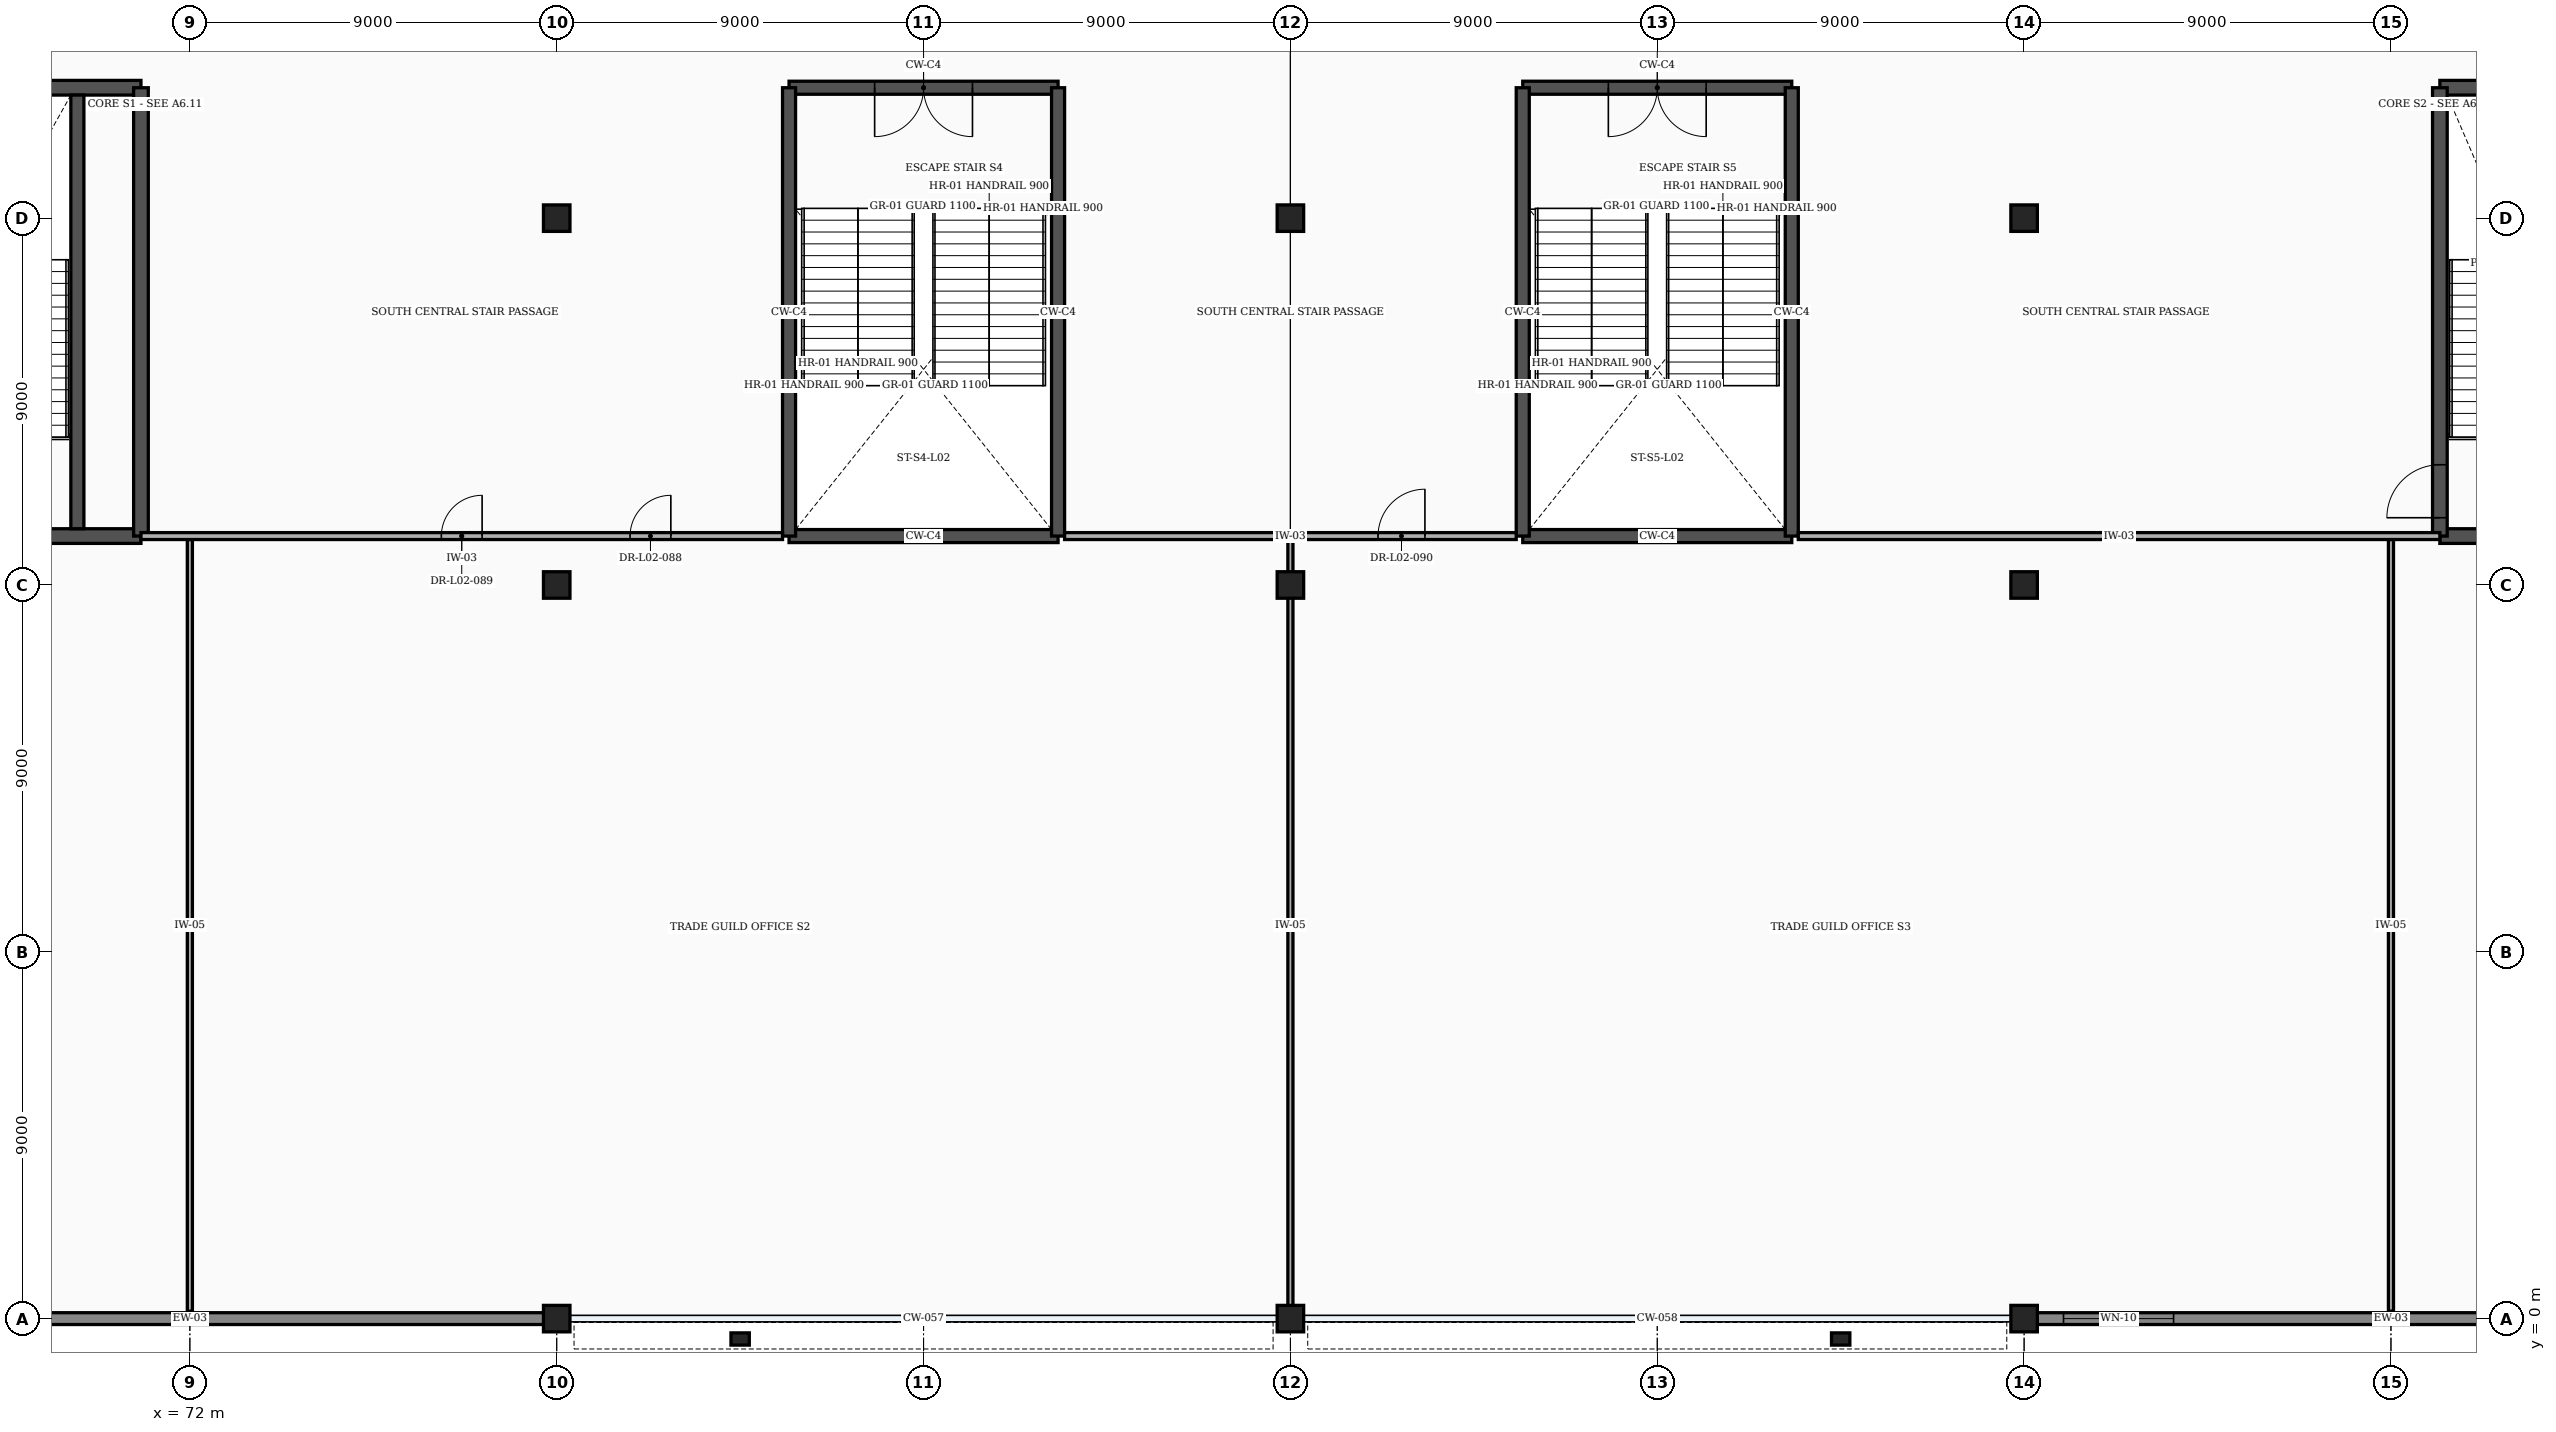
"""IFC4 building model, lengths in metres.
Left out: names, types, materials, properties, quantities, classifications, styles, units other than length and angle.
Written with IfcOpenShell. Run it as: python <this file> out.ifc"""

import sys

from ifc_helpers import new_model, si_unit, direction, frame, frame_2d, origin, origin_2d, place, context, subcontext, project, spatial, rectangle, extrude, element, fill, save


model = new_model("IFC4")
c1 = context("Model", 3, precision=1e-05, world=origin(), true_north=direction((0.0, 1.0)))
c2 = subcontext(c1, "Body", "Model", "MODEL_VIEW")
j1 = project(units=[si_unit("LENGTHUNIT", "METRE"), si_unit("PLANEANGLEUNIT", "RADIAN")], contexts=[c1])
p1 = place(None, origin())
s1 = spatial("IfcSite", under=j1, at=p1, CompositionType="ELEMENT")
p2 = place(p1, origin())
s2 = spatial("IfcBuilding", under=s1, at=p2, CompositionType="ELEMENT")
p3 = place(p2, frame((0.0, 0.0, 11.4)))
s3 = spatial("IfcBuildingStorey", under=s2, at=p3, CompositionType="ELEMENT", Elevation=11.4)
for number, where, z_axis, x_axis in (
    (1, (81.0, 0.0, 0.0), (0.0, 0.0, 1.0), (1.0, 0.0, 0.0)),
    (2, (81.0, 18.0, 0.0), (0.0, 0.0, 1.0), (1.0, 0.0, 0.0)),
    (3, (81.0, 27.0, 0.0), (0.0, 0.0, 1.0), (1.0, 0.0, 0.0)),
    (4, (99.0, 0.0, 0.0), (0.0, 0.0, 1.0), (1.0, 0.0, 0.0)),
    (5, (99.0, 18.0, 0.0), (0.0, 0.0, 1.0), (1.0, 0.0, 0.0)),
    (6, (99.0, 27.0, 0.0), (0.0, 0.0, 1.0), (1.0, 0.0, 0.0)),
    (7, (117.0, 0.0, 0.0), (0.0, 0.0, 1.0), (1.0, 0.0, 0.0)),
    (8, (117.0, 18.0, 0.0), (0.0, 0.0, 1.0), (1.0, 0.0, 0.0)),
    (9, (117.0, 27.0, 0.0), (0.0, 0.0, 1.0), (1.0, 0.0, 0.0)),
):
    element("IfcColumn", number, at=place(p3, frame(where, z_axis=z_axis, x_axis=x_axis)), inside=s3, PredefinedType="COLUMN", context=c2, shape_type="SweptSolid", body=[
        extrude(rectangle(XDim=0.65, YDim=0.65, at=origin_2d()), origin(), (0.0, 0.0, 1.0), 5.4),
    ])
for number, where, z_axis, x_axis in (
    (10, (85.5, -0.5, 0.0), (0.0, 0.0, 1.0), (1.0, 0.0, 0.0)),
    (11, (112.5, -0.5, 0.0), (0.0, 0.0, 1.0), (1.0, 0.0, 0.0)),
):
    element("IfcColumn", number, at=place(p3, frame(where, z_axis=z_axis, x_axis=x_axis)), inside=s3, PredefinedType="PILASTER", context=c2, shape_type="SweptSolid", body=[
        extrude(rectangle(XDim=0.45, YDim=0.3, at=origin_2d()), origin(), (0.0, 0.0, 1.0), 5.4),
    ])
p4 = place(p3, frame((63.317, 0.0, 0.0), z_axis=(0.0, 0.0, 1.0), x_axis=(1.0, 0.0, 0.0)))
e12 = element("IfcWall", 12, at=p4, inside=s3, PredefinedType="STANDARD", context=c2, shape_type="SweptSolid", body=[
    extrude(rectangle(XDim=17.366, YDim=0.29, at=frame_2d((8.683, 0.0))), origin(), (0.0, 0.0, 1.0), 4.38),
])
p5 = place(p4, frame((0.65, 0.0, 0.85)))
e13 = element("IfcOpeningElement", 13, at=p5, cuts=e12, PredefinedType="OPENING", context=c2, shape_type="SweptSolid", body=[
    extrude(rectangle(XDim=2.7, YDim=2.4, at=frame_2d((1.35, 1.2))), frame((0.0, 0.157, 0.0), z_axis=(0.0, -1.0, 0.0), x_axis=(1.0, 0.0, 0.0)), (0.0, 0.0, 1.0), 0.314),
])
p6 = place(p3, frame((117.317, 0.0, 0.0), z_axis=(0.0, 0.0, 1.0), x_axis=(1.0, 0.0, 0.0)))
e14 = element("IfcWall", 14, at=p6, inside=s3, PredefinedType="STANDARD", context=c2, shape_type="SweptSolid", body=[
    extrude(rectangle(XDim=17.366, YDim=0.29, at=frame_2d((8.683, 0.0))), origin(), (0.0, 0.0, 1.0), 4.38),
])
p7 = place(p6, frame((0.65, 0.0, 0.85)))
e15 = element("IfcOpeningElement", 15, at=p7, cuts=e14, PredefinedType="OPENING", context=c2, shape_type="SweptSolid", body=[
    extrude(rectangle(XDim=2.7, YDim=2.4, at=frame_2d((1.35, 1.2))), frame((0.0, 0.157, 0.0), z_axis=(0.0, -1.0, 0.0), x_axis=(1.0, 0.0, 0.0)), (0.0, 0.0, 1.0), 0.314),
])
for number, where, z_axis, x_axis in (
    (16, (64.2, 19.2, 0.0), (0.0, 0.0, 1.0), (1.0, 0.0, 0.0)),
    (17, (64.2, 30.2, 0.0), (0.0, 0.0, 1.0), (1.0, 0.0, 0.0)),
):
    element("IfcWall", number, at=place(p3, frame(where, z_axis=z_axis, x_axis=x_axis)), inside=s3, PredefinedType="SHEAR", context=c2, shape_type="SweptSolid", body=[
        extrude(rectangle(XDim=6.6, YDim=0.36, at=frame_2d((3.3, 0.0))), origin(), (0.0, 0.0, 1.0), 5.15),
    ])
p8 = place(p3, frame((70.8, 19.2, 0.0), z_axis=(0.0, 0.0, 1.0), x_axis=(0.0, 1.0, 0.0)))
e18 = element("IfcWall", 18, at=p8, inside=s3, PredefinedType="SHEAR", context=c2, shape_type="SweptSolid", body=[
    extrude(rectangle(XDim=11.0, YDim=0.36, at=frame_2d((5.5, 0.0))), origin(), (0.0, 0.0, 1.0), 5.15),
])
p9 = place(p3, frame((69.24, 19.38, 0.0), z_axis=(0.0, 0.0, 1.0), x_axis=(0.0, 1.0, 0.0)))
e19 = element("IfcWall", 19, at=p9, inside=s3, PredefinedType="SHEAR", context=c2, shape_type="SweptSolid", body=[
    extrude(rectangle(XDim=10.64, YDim=0.32, at=frame_2d((5.32, 0.0))), origin(), (0.0, 0.0, 1.0), 5.15),
])
p10 = place(p3, frame((127.2, 19.2, 0.0), z_axis=(0.0, 0.0, 1.0), x_axis=(1.0, 0.0, 0.0)))
e20 = element("IfcWall", 20, at=p10, inside=s3, PredefinedType="SHEAR", context=c2, shape_type="SweptSolid", body=[
    extrude(rectangle(XDim=6.6, YDim=0.36, at=frame_2d((3.3, 0.0))), origin(), (0.0, 0.0, 1.0), 5.15),
])
p11 = place(p3, frame((127.2, 30.2, 0.0), z_axis=(0.0, 0.0, 1.0), x_axis=(1.0, 0.0, 0.0)))
e21 = element("IfcWall", 21, at=p11, inside=s3, PredefinedType="SHEAR", context=c2, shape_type="SweptSolid", body=[
    extrude(rectangle(XDim=6.6, YDim=0.36, at=frame_2d((3.3, 0.0))), origin(), (0.0, 0.0, 1.0), 5.15),
])
p12 = place(p11, frame((4.45, 0.0, 0.0)))
e22 = element("IfcOpeningElement", 22, at=p12, cuts=e21, PredefinedType="OPENING", context=c2, shape_type="SweptSolid", body=[
    extrude(rectangle(XDim=1.6, YDim=2.3, at=frame_2d((0.8, 1.15))), frame((0.0, 0.192, 0.0), z_axis=(0.0, -1.0, 0.0), x_axis=(1.0, 0.0, 0.0)), (0.0, 0.0, 1.0), 0.384),
])
p13 = place(p3, frame((127.2, 19.2, 0.0), z_axis=(0.0, 0.0, 1.0), x_axis=(0.0, 1.0, 0.0)))
e23 = element("IfcWall", 23, at=p13, inside=s3, PredefinedType="SHEAR", context=c2, shape_type="SweptSolid", body=[
    extrude(rectangle(XDim=11.0, YDim=0.36, at=frame_2d((5.5, 0.0))), origin(), (0.0, 0.0, 1.0), 5.15),
])
p14 = place(p13, frame((0.45, 0.0, 0.0)))
e24 = element("IfcOpeningElement", 24, at=p14, cuts=e23, PredefinedType="OPENING", context=c2, shape_type="SweptSolid", body=[
    extrude(rectangle(XDim=1.3, YDim=2.2, at=frame_2d((0.65, 1.1))), frame((0.0, 0.192, 0.0), z_axis=(0.0, -1.0, 0.0), x_axis=(1.0, 0.0, 0.0)), (0.0, 0.0, 1.0), 0.384),
])
p15 = place(p3, frame((86.7, 19.2, 0.0), z_axis=(0.0, 0.0, 1.0), x_axis=(1.0, 0.0, 0.0)))
e25 = element("IfcWall", 25, at=p15, inside=s3, PredefinedType="SHEAR", context=c2, shape_type="SweptSolid", body=[
    extrude(rectangle(XDim=6.6, YDim=0.32, at=frame_2d((3.3, 0.0))), origin(), (0.0, 0.0, 1.0), 5.15),
])
p16 = place(p3, frame((86.7, 30.2, 0.0), z_axis=(0.0, 0.0, 1.0), x_axis=(1.0, 0.0, 0.0)))
e26 = element("IfcWall", 26, at=p16, inside=s3, PredefinedType="SHEAR", context=c2, shape_type="SweptSolid", body=[
    extrude(rectangle(XDim=6.6, YDim=0.32, at=frame_2d((3.3, 0.0))), origin(), (0.0, 0.0, 1.0), 5.15),
])
p17 = place(p16, frame((2.1, 0.0, 0.0)))
e27 = element("IfcOpeningElement", 27, at=p17, cuts=e26, PredefinedType="OPENING", context=c2, shape_type="SweptSolid", body=[
    extrude(rectangle(XDim=2.4, YDim=2.25, at=frame_2d((1.2, 1.125))), frame((0.0, 0.172, 0.0), z_axis=(0.0, -1.0, 0.0), x_axis=(1.0, 0.0, 0.0)), (0.0, 0.0, 1.0), 0.344),
])
for number, where, z_axis, x_axis in (
    (28, (86.7, 19.2, 0.0), (0.0, 0.0, 1.0), (0.0, 1.0, 0.0)),
    (29, (93.3, 19.2, 0.0), (0.0, 0.0, 1.0), (0.0, 1.0, 0.0)),
):
    element("IfcWall", number, at=place(p3, frame(where, z_axis=z_axis, x_axis=x_axis)), inside=s3, PredefinedType="SHEAR", context=c2, shape_type="SweptSolid", body=[
        extrude(rectangle(XDim=11.0, YDim=0.32, at=frame_2d((5.5, 0.0))), origin(), (0.0, 0.0, 1.0), 5.15),
    ])
p18 = place(p3, frame((104.7, 19.2, 0.0), z_axis=(0.0, 0.0, 1.0), x_axis=(1.0, 0.0, 0.0)))
e30 = element("IfcWall", 30, at=p18, inside=s3, PredefinedType="SHEAR", context=c2, shape_type="SweptSolid", body=[
    extrude(rectangle(XDim=6.6, YDim=0.32, at=frame_2d((3.3, 0.0))), origin(), (0.0, 0.0, 1.0), 5.15),
])
p19 = place(p3, frame((104.7, 30.2, 0.0), z_axis=(0.0, 0.0, 1.0), x_axis=(1.0, 0.0, 0.0)))
e31 = element("IfcWall", 31, at=p19, inside=s3, PredefinedType="SHEAR", context=c2, shape_type="SweptSolid", body=[
    extrude(rectangle(XDim=6.6, YDim=0.32, at=frame_2d((3.3, 0.0))), origin(), (0.0, 0.0, 1.0), 5.15),
])
p20 = place(p19, frame((2.1, 0.0, 0.0)))
e32 = element("IfcOpeningElement", 32, at=p20, cuts=e31, PredefinedType="OPENING", context=c2, shape_type="SweptSolid", body=[
    extrude(rectangle(XDim=2.4, YDim=2.25, at=frame_2d((1.2, 1.125))), frame((0.0, 0.172, 0.0), z_axis=(0.0, -1.0, 0.0), x_axis=(1.0, 0.0, 0.0)), (0.0, 0.0, 1.0), 0.344),
])
for number, where, z_axis, x_axis in (
    (33, (104.7, 19.2, 0.0), (0.0, 0.0, 1.0), (0.0, 1.0, 0.0)),
    (34, (111.3, 19.2, 0.0), (0.0, 0.0, 1.0), (0.0, 1.0, 0.0)),
):
    element("IfcWall", number, at=place(p3, frame(where, z_axis=z_axis, x_axis=x_axis)), inside=s3, PredefinedType="SHEAR", context=c2, shape_type="SweptSolid", body=[
        extrude(rectangle(XDim=11.0, YDim=0.32, at=frame_2d((5.5, 0.0))), origin(), (0.0, 0.0, 1.0), 5.15),
    ])
p21 = place(p3, frame((72.0, 0.183, 0.0), z_axis=(0.0, 0.0, 1.0), x_axis=(0.0, 1.0, 0.0)))
e35 = element("IfcWall", 35, at=p21, inside=s3, PredefinedType="PARTITIONING", context=c2, shape_type="SweptSolid", body=[
    extrude(rectangle(XDim=18.932, YDim=0.125, at=frame_2d((9.466, 0.0))), origin(), (0.0, 0.0, 1.0), 5.15),
])
p22 = place(p3, frame((99.0, 0.183, 0.0), z_axis=(0.0, 0.0, 1.0), x_axis=(0.0, 1.0, 0.0)))
e36 = element("IfcWall", 36, at=p22, inside=s3, PredefinedType="PARTITIONING", context=c2, shape_type="SweptSolid", body=[
    extrude(rectangle(XDim=18.932, YDim=0.125, at=frame_2d((9.466, 0.0))), origin(), (0.0, 0.0, 1.0), 4.53),
])
p23 = place(p3, frame((126.0, 0.183, 0.0), z_axis=(0.0, 0.0, 1.0), x_axis=(0.0, 1.0, 0.0)))
e37 = element("IfcWall", 37, at=p23, inside=s3, PredefinedType="PARTITIONING", context=c2, shape_type="SweptSolid", body=[
    extrude(rectangle(XDim=18.932, YDim=0.125, at=frame_2d((9.466, 0.0))), origin(), (0.0, 0.0, 1.0), 5.15),
])
p24 = place(p3, frame((70.8, 19.2, 0.0), z_axis=(0.0, 0.0, 1.0), x_axis=(1.0, 0.0, 0.0)))
e38 = element("IfcWall", 38, at=p24, inside=s3, PredefinedType="PARTITIONING", context=c2, shape_type="SweptSolid", body=[
    extrude(rectangle(XDim=15.74, YDim=0.17, at=frame_2d((7.87, 0.0))), origin(), (0.0, 0.0, 1.0), 5.15),
])
p25 = place(p24, frame((12.0, 0.0, 0.0)))
e39 = element("IfcOpeningElement", 39, at=p25, cuts=e38, PredefinedType="OPENING", context=c2, shape_type="SweptSolid", body=[
    extrude(rectangle(XDim=1.0, YDim=2.15, at=frame_2d((0.5, 1.075))), frame((0.0, 0.097, 0.0), z_axis=(0.0, -1.0, 0.0), x_axis=(1.0, 0.0, 0.0)), (0.0, 0.0, 1.0), 0.194),
])
p26 = place(p24, frame((7.37, 0.0, 0.0)))
e40 = element("IfcOpeningElement", 40, at=p26, cuts=e38, PredefinedType="OPENING", context=c2, shape_type="SweptSolid", body=[
    extrude(rectangle(XDim=1.0, YDim=2.15, at=frame_2d((0.5, 1.075))), frame((0.0, 0.097, 0.0), z_axis=(0.0, -1.0, 0.0), x_axis=(1.0, 0.0, 0.0)), (0.0, 0.0, 1.0), 0.194),
])
p27 = place(p3, frame((93.46, 19.2, 0.0), z_axis=(0.0, 0.0, 1.0), x_axis=(1.0, 0.0, 0.0)))
e41 = element("IfcWall", 41, at=p27, inside=s3, PredefinedType="PARTITIONING", context=c2, shape_type="SweptSolid", body=[
    extrude(rectangle(XDim=11.08, YDim=0.17, at=frame_2d((5.54, 0.0))), origin(), (0.0, 0.0, 1.0), 5.15),
])
p28 = place(p27, frame((7.69, 0.0, 0.0)))
e42 = element("IfcOpeningElement", 42, at=p28, cuts=e41, PredefinedType="OPENING", context=c2, shape_type="SweptSolid", body=[
    extrude(rectangle(XDim=1.15, YDim=2.15, at=frame_2d((0.575, 1.075))), frame((0.0, 0.097, 0.0), z_axis=(0.0, -1.0, 0.0), x_axis=(1.0, 0.0, 0.0)), (0.0, 0.0, 1.0), 0.194),
])
p29 = place(p3, frame((111.46, 19.2, 0.0), z_axis=(0.0, 0.0, 1.0), x_axis=(1.0, 0.0, 0.0)))
e43 = element("IfcWall", 43, at=p29, inside=s3, PredefinedType="PARTITIONING", context=c2, shape_type="SweptSolid", body=[
    extrude(rectangle(XDim=15.74, YDim=0.17, at=frame_2d((7.87, 0.0))), origin(), (0.0, 0.0, 1.0), 5.15),
])
p30 = place(p7, origin())
e44 = element("IfcWindow", 44, at=p30, inside=s3, PartitioningType="SINGLE_PANEL", PredefinedType="WINDOW", context=c2, shape_type="SweptSolid", body=[
    extrude(rectangle(XDim=2.7, YDim=2.4, at=frame_2d((1.35, 1.2))), frame((0.0, 0.03, 0.0), z_axis=(0.0, -1.0, 0.0), x_axis=(1.0, 0.0, 0.0)), (0.0, 0.0, 1.0), 0.06),
])
fill(e15, e44)
p31 = place(p14, origin())
e45 = element("IfcDoor", 45, at=p31, inside=s3, OperationType="SINGLE_SWING_LEFT", PredefinedType="DOOR", context=c2, shape_type="SweptSolid", body=[
    extrude(rectangle(XDim=1.3, YDim=2.2, at=frame_2d((0.65, 1.1))), frame((0.0, 0.025, 0.0), z_axis=(0.0, -1.0, 0.0), x_axis=(1.0, 0.0, 0.0)), (0.0, 0.0, 1.0), 0.05),
])
fill(e24, e45)
p32 = place(p17, frame((2.4, 0.0, 0.0), z_axis=(0.0, 0.0, 1.0), x_axis=(-1.0, 0.0, 0.0)))
e46 = element("IfcDoor", 46, at=p32, inside=s3, OperationType="DOUBLE_DOOR_SINGLE_SWING", PredefinedType="DOOR", context=c2, shape_type="SweptSolid", body=[
    extrude(rectangle(XDim=2.4, YDim=2.25, at=frame_2d((1.2, 1.125))), frame((0.0, 0.025, 0.0), z_axis=(0.0, -1.0, 0.0), x_axis=(1.0, 0.0, 0.0)), (0.0, 0.0, 1.0), 0.05),
])
fill(e27, e46)
p33 = place(p20, frame((2.4, 0.0, 0.0), z_axis=(0.0, 0.0, 1.0), x_axis=(-1.0, 0.0, 0.0)))
e47 = element("IfcDoor", 47, at=p33, inside=s3, OperationType="DOUBLE_DOOR_SINGLE_SWING", PredefinedType="DOOR", context=c2, shape_type="SweptSolid", body=[
    extrude(rectangle(XDim=2.4, YDim=2.25, at=frame_2d((1.2, 1.125))), frame((0.0, 0.025, 0.0), z_axis=(0.0, -1.0, 0.0), x_axis=(1.0, 0.0, 0.0)), (0.0, 0.0, 1.0), 0.05),
])
fill(e32, e47)
p34 = place(p25, origin())
e48 = element("IfcDoor", 48, at=p34, inside=s3, OperationType="SINGLE_SWING_RIGHT", PredefinedType="DOOR", context=c2, shape_type="SweptSolid", body=[
    extrude(rectangle(XDim=1.0, YDim=2.15, at=frame_2d((0.5, 1.075))), frame((0.0, 0.025, 0.0), z_axis=(0.0, -1.0, 0.0), x_axis=(1.0, 0.0, 0.0)), (0.0, 0.0, 1.0), 0.05),
])
fill(e39, e48)
p35 = place(p26, origin())
e49 = element("IfcDoor", 49, at=p35, inside=s3, OperationType="SINGLE_SWING_RIGHT", PredefinedType="DOOR", context=c2, shape_type="SweptSolid", body=[
    extrude(rectangle(XDim=1.0, YDim=2.15, at=frame_2d((0.5, 1.075))), frame((0.0, 0.025, 0.0), z_axis=(0.0, -1.0, 0.0), x_axis=(1.0, 0.0, 0.0)), (0.0, 0.0, 1.0), 0.05),
])
fill(e40, e49)
p36 = place(p28, origin())
e50 = element("IfcDoor", 50, at=p36, inside=s3, OperationType="SINGLE_SWING_RIGHT", PredefinedType="DOOR", context=c2, shape_type="SweptSolid", body=[
    extrude(rectangle(XDim=1.15, YDim=2.15, at=frame_2d((0.575, 1.075))), frame((0.0, 0.025, 0.0), z_axis=(0.0, -1.0, 0.0), x_axis=(1.0, 0.0, 0.0)), (0.0, 0.0, 1.0), 0.05),
])
fill(e42, e50)
save(model, sys.argv[1])
